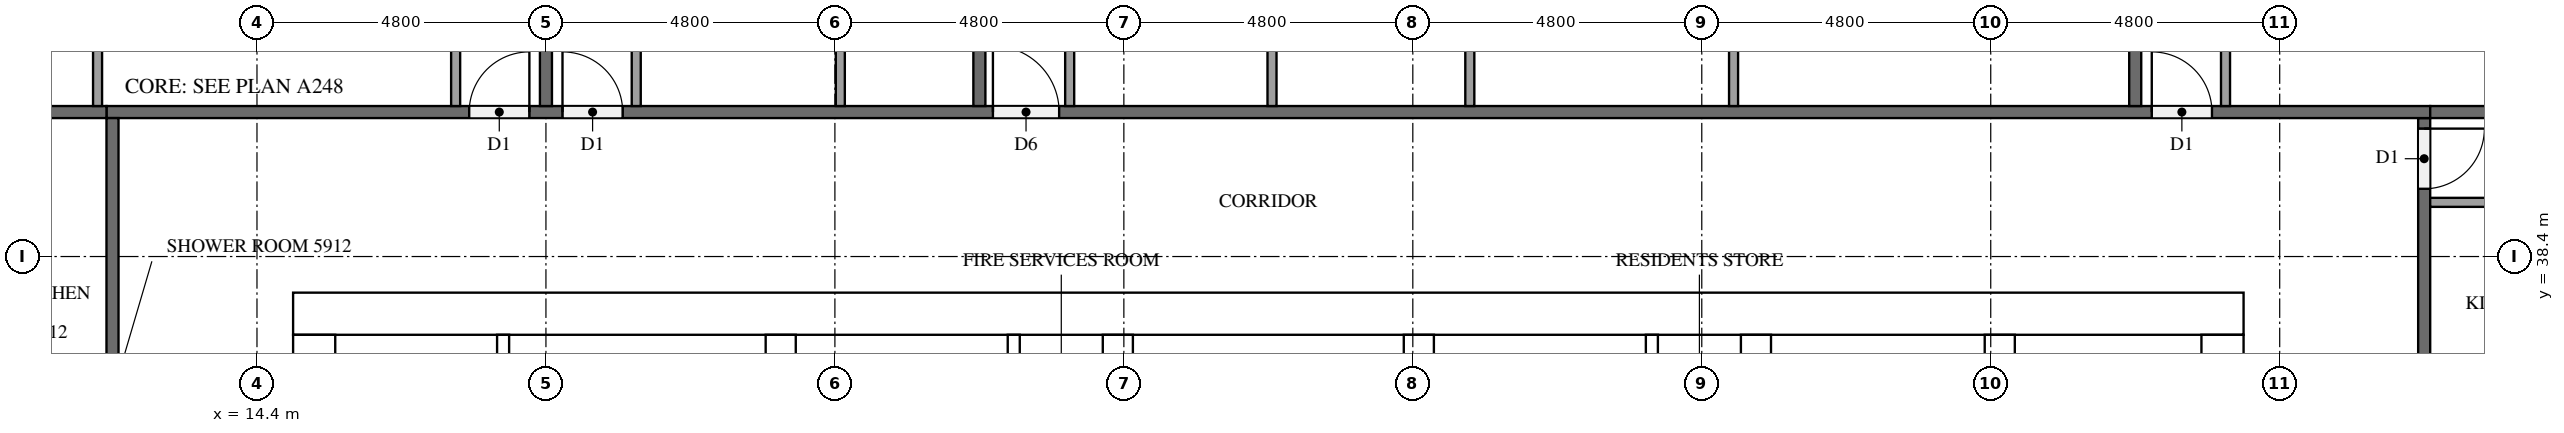
"""IFC4 building model, lengths in metres.
Left out: names, types, materials, properties, quantities, classifications, styles, units other than length and angle.
Written with IfcOpenShell. Run it as: python <this file> out.ifc"""

import sys

from ifc_helpers import new_model, si_unit, direction, frame, frame_2d, origin, place, context, subcontext, project, spatial, rectangle, extrude, element, fill, save


model = new_model("IFC4")
c1 = context("Model", 3, precision=1e-05, world=origin(), true_north=direction((0.0, 1.0)))
c2 = subcontext(c1, "Body", "Model", "MODEL_VIEW")
j1 = project(units=[si_unit("LENGTHUNIT", "METRE"), si_unit("PLANEANGLEUNIT", "RADIAN")], contexts=[c1])
p1 = place(None, origin())
s1 = spatial("IfcSite", under=j1, at=p1, CompositionType="ELEMENT")
p2 = place(p1, origin())
s2 = spatial("IfcBuilding", under=s1, at=p2, CompositionType="ELEMENT")
p3 = place(p2, frame((0.0, 0.0, 226.3)))
s3 = spatial("IfcBuildingStorey", under=s2, at=p3, CompositionType="ELEMENT", Elevation=226.3)
p4 = place(p3, frame((15.0, 37.45, 0.0), z_axis=(0.0, 0.0, 1.0), x_axis=(1.0, 0.0, 0.0)))
e1 = element("IfcWall", 1, at=p4, inside=s3, PredefinedType="SHEAR", context=c2, shape_type="SweptSolid", body=[
    extrude(rectangle(XDim=32.4, YDim=0.7, at=frame_2d((16.2, 0.0))), origin(), (0.0, 0.0, 1.0), 3.2),
])
p5 = place(p4, frame((15.3, 0.0, 0.0)))
e2 = element("IfcOpeningElement", 2, at=p5, cuts=e1, PredefinedType="OPENING", context=c2, shape_type="SweptSolid", body=[
    extrude(rectangle(XDim=1.8, YDim=2.1, at=frame_2d((0.9, 1.05))), frame((0.0, 0.36, 0.0), z_axis=(0.0, -1.0, 0.0), x_axis=(1.0, 0.0, 0.0)), (0.0, 0.0, 1.0), 0.72),
])
p6 = place(p4, frame((1.544, 0.0, 0.0)))
e3 = element("IfcOpeningElement", 3, at=p6, cuts=e1, PredefinedType="OPENING", context=c2, shape_type="SweptSolid", body=[
    extrude(rectangle(XDim=1.0, YDim=2.1, at=frame_2d((0.5, 1.05))), frame((0.0, 0.36, 0.0), z_axis=(0.0, -1.0, 0.0), x_axis=(1.0, 0.0, 0.0)), (0.0, 0.0, 1.0), 0.72),
])
p7 = place(p4, frame((5.219, 0.0, 0.0)))
e4 = element("IfcOpeningElement", 4, at=p7, cuts=e1, PredefinedType="OPENING", context=c2, shape_type="SweptSolid", body=[
    extrude(rectangle(XDim=1.0, YDim=2.1, at=frame_2d((0.5, 1.05))), frame((0.0, 0.36, 0.0), z_axis=(0.0, -1.0, 0.0), x_axis=(1.0, 0.0, 0.0)), (0.0, 0.0, 1.0), 0.72),
])
p8 = place(p3, frame((15.35, 15.7, 0.0), z_axis=(0.0, 0.0, 1.0), x_axis=(0.0, 1.0, 0.0)))
e5 = element("IfcWall", 5, at=p8, inside=s3, PredefinedType="SHEAR", context=c2, shape_type="SweptSolid", body=[
    extrude(rectangle(XDim=21.4, YDim=0.7, at=frame_2d((10.7, 0.0))), origin(), (0.0, 0.0, 1.0), 3.2),
])
p9 = place(p8, frame((5.06, 0.0, 0.0)))
e6 = element("IfcOpeningElement", 6, at=p9, cuts=e5, PredefinedType="OPENING", context=c2, shape_type="SweptSolid", body=[
    extrude(rectangle(XDim=1.2, YDim=2.1, at=frame_2d((0.6, 1.05))), frame((0.0, 0.36, 0.0), z_axis=(0.0, -1.0, 0.0), x_axis=(1.0, 0.0, 0.0)), (0.0, 0.0, 1.0), 0.72),
])
p10 = place(p3, frame((47.05, 15.7, 0.0), z_axis=(0.0, 0.0, 1.0), x_axis=(0.0, 1.0, 0.0)))
e7 = element("IfcWall", 7, at=p10, inside=s3, PredefinedType="SHEAR", context=c2, shape_type="SweptSolid", body=[
    extrude(rectangle(XDim=21.4, YDim=0.7, at=frame_2d((10.7, 0.0))), origin(), (0.0, 0.0, 1.0), 3.2),
])
p11 = place(p10, frame((10.4, 0.0, 0.0)))
e8 = element("IfcOpeningElement", 8, at=p11, cuts=e7, PredefinedType="OPENING", context=c2, shape_type="SweptSolid", body=[
    extrude(rectangle(XDim=1.2, YDim=2.1, at=frame_2d((0.6, 1.05))), frame((0.0, 0.36, 0.0), z_axis=(0.0, -1.0, 0.0), x_axis=(1.0, 0.0, 0.0)), (0.0, 0.0, 1.0), 0.72),
])
p12 = place(p3, frame((23.1, 15.7, 0.0), z_axis=(0.0, 0.0, 1.0), x_axis=(0.0, 1.0, 0.0)))
e9 = element("IfcWall", 9, at=p12, inside=s3, PredefinedType="SHEAR", context=c2, shape_type="SweptSolid", body=[
    extrude(rectangle(XDim=21.4, YDim=0.5, at=frame_2d((10.7, 0.0))), origin(), (0.0, 0.0, 1.0), 3.2),
])
p13 = place(p3, frame((39.3, 27.75, 0.0), z_axis=(0.0, 0.0, 1.0), x_axis=(0.0, 1.0, 0.0)))
e10 = element("IfcWall", 10, at=p13, inside=s3, PredefinedType="SHEAR", context=c2, shape_type="SweptSolid", body=[
    extrude(rectangle(XDim=9.35, YDim=0.5, at=frame_2d((4.675, 0.0))), origin(), (0.0, 0.0, 1.0), 3.2),
])
p14 = place(p3, frame((43.35, 27.75, 0.0), z_axis=(0.0, 0.0, 1.0), x_axis=(0.0, 1.0, 0.0)))
e11 = element("IfcWall", 11, at=p14, inside=s3, PredefinedType="SHEAR", context=c2, shape_type="SweptSolid", body=[
    extrude(rectangle(XDim=9.35, YDim=0.5, at=frame_2d((4.675, 0.0))), origin(), (0.0, 0.0, 1.0), 3.2),
])
p15 = place(p14, frame((7.65, 0.0, 0.0)))
e12 = element("IfcOpeningElement", 12, at=p15, cuts=e11, PredefinedType="OPENING", context=c2, shape_type="SweptSolid", body=[
    extrude(rectangle(XDim=1.2, YDim=2.1, at=frame_2d((0.6, 1.05))), frame((0.0, 0.26, 0.0), z_axis=(0.0, -1.0, 0.0), x_axis=(1.0, 0.0, 0.0)), (0.0, 0.0, 1.0), 0.52),
])
for number, where, z_axis, x_axis in (
    (13, (28.7, 33.8, 0.0), (0.0, 0.0, 1.0), (0.0, 1.0, 0.0)),
    (14, (33.7, 33.8, 0.0), (0.0, 0.0, 1.0), (0.0, 1.0, 0.0)),
):
    element("IfcWall", number, at=place(p3, frame(where, z_axis=z_axis, x_axis=x_axis)), inside=s3, PredefinedType="SHEAR", context=c2, shape_type="SweptSolid", body=[
        extrude(rectangle(XDim=3.3, YDim=0.5, at=frame_2d((1.65, 0.0))), origin(), (0.0, 0.0, 1.0), 3.2),
    ])
p16 = place(p3, frame((18.489, 31.5, 0.0), z_axis=(0.0, 0.0, 1.0), x_axis=(0.0, 1.0, 0.0)))
e15 = element("IfcWall", 15, at=p16, inside=s3, PredefinedType="PARTITIONING", context=c2, shape_type="SweptSolid", body=[
    extrude(rectangle(XDim=5.6, YDim=0.2, at=frame_2d((2.8, 0.0))), origin(), (0.0, 0.0, 1.0), 3.2),
])
for number, where, z_axis, x_axis in (
    (16, (26.971, 33.8, 0.0), (0.0, 0.0, 1.0), (0.0, 1.0, 0.0)),
    (17, (37.571, 33.8, 0.0), (0.0, 0.0, 1.0), (0.0, 1.0, 0.0)),
):
    element("IfcWall", number, at=place(p3, frame(where, z_axis=z_axis, x_axis=x_axis)), inside=s3, PredefinedType="PARTITIONING", context=c2, shape_type="SweptSolid", body=[
        extrude(rectangle(XDim=3.3, YDim=0.2, at=frame_2d((1.65, 0.0))), origin(), (0.0, 0.0, 1.0), 3.2),
    ])
p17 = place(p3, frame((50.4, 40.7, 0.0), z_axis=(0.0, 0.0, 1.0), x_axis=(0.0, -1.0, 0.0)))
e18 = element("IfcWall", 18, at=p17, inside=s3, PredefinedType="PARTITIONING", context=c2, shape_type="SweptSolid", body=[
    extrude(rectangle(XDim=28.6, YDim=0.2, at=frame_2d((14.3, 0.0))), origin(), (0.0, 0.0, 1.0), 3.2),
])
p18 = place(p17, frame((21.775, 0.0, 0.0)))
e19 = element("IfcOpeningElement", 19, at=p18, cuts=e18, PredefinedType="OPENING", context=c2, shape_type="SweptSolid", body=[
    extrude(rectangle(XDim=1.0, YDim=2.1, at=frame_2d((0.5, 1.05))), frame((0.0, 0.11, 0.0), z_axis=(0.0, -1.0, 0.0), x_axis=(1.0, 0.0, 0.0)), (0.0, 0.0, 1.0), 0.22),
])
p19 = place(p17, frame((7.375, 0.0, 0.0)))
e20 = element("IfcOpeningElement", 20, at=p19, cuts=e18, PredefinedType="OPENING", context=c2, shape_type="SweptSolid", body=[
    extrude(rectangle(XDim=1.0, YDim=2.1, at=frame_2d((0.5, 1.05))), frame((0.0, 0.11, 0.0), z_axis=(0.0, -1.0, 0.0), x_axis=(1.0, 0.0, 0.0)), (0.0, 0.0, 1.0), 0.22),
])
p20 = place(p17, frame((0.175, 0.0, 0.0)))
e21 = element("IfcOpeningElement", 21, at=p20, cuts=e18, PredefinedType="OPENING", context=c2, shape_type="SweptSolid", body=[
    extrude(rectangle(XDim=1.0, YDim=2.1, at=frame_2d((0.5, 1.05))), frame((0.0, 0.11, 0.0), z_axis=(0.0, -1.0, 0.0), x_axis=(1.0, 0.0, 0.0)), (0.0, 0.0, 1.0), 0.22),
])
p21 = place(p3, frame((11.9, 40.8, 0.0), z_axis=(0.0, 0.0, 1.0), x_axis=(1.0, 0.0, 0.0)))
e22 = element("IfcWall", 22, at=p21, inside=s3, PredefinedType="PARTITIONING", context=c2, shape_type="SweptSolid", body=[
    extrude(rectangle(XDim=38.6, YDim=0.2, at=frame_2d((19.3, 0.0))), origin(), (0.0, 0.0, 1.0), 3.2),
])
p22 = place(p21, frame((33.975, 0.0, 0.0)))
e23 = element("IfcOpeningElement", 23, at=p22, cuts=e22, PredefinedType="OPENING", context=c2, shape_type="SweptSolid", body=[
    extrude(rectangle(XDim=1.0, YDim=2.1, at=frame_2d((0.5, 1.05))), frame((0.0, 0.11, 0.0), z_axis=(0.0, -1.0, 0.0), x_axis=(1.0, 0.0, 0.0)), (0.0, 0.0, 1.0), 0.22),
])
p23 = place(p21, frame((14.725, 0.0, 0.0)))
e24 = element("IfcOpeningElement", 24, at=p23, cuts=e22, PredefinedType="OPENING", context=c2, shape_type="SweptSolid", body=[
    extrude(rectangle(XDim=1.1, YDim=2.1, at=frame_2d((0.55, 1.05))), frame((0.0, 0.11, 0.0), z_axis=(0.0, -1.0, 0.0), x_axis=(1.0, 0.0, 0.0)), (0.0, 0.0, 1.0), 0.22),
])
p24 = place(p21, frame((7.575, 0.0, 0.0)))
e25 = element("IfcOpeningElement", 25, at=p24, cuts=e22, PredefinedType="OPENING", context=c2, shape_type="SweptSolid", body=[
    extrude(rectangle(XDim=1.0, YDim=2.1, at=frame_2d((0.5, 1.05))), frame((0.0, 0.11, 0.0), z_axis=(0.0, -1.0, 0.0), x_axis=(1.0, 0.0, 0.0)), (0.0, 0.0, 1.0), 0.22),
])
p25 = place(p21, frame((6.025, 0.0, 0.0)))
e26 = element("IfcOpeningElement", 26, at=p25, cuts=e22, PredefinedType="OPENING", context=c2, shape_type="SweptSolid", body=[
    extrude(rectangle(XDim=1.0, YDim=2.1, at=frame_2d((0.5, 1.05))), frame((0.0, 0.11, 0.0), z_axis=(0.0, -1.0, 0.0), x_axis=(1.0, 0.0, 0.0)), (0.0, 0.0, 1.0), 0.22),
])
p26 = place(p3, frame((12.0, 12.1, 0.0), z_axis=(0.0, 0.0, 1.0), x_axis=(0.0, 1.0, 0.0)))
e27 = element("IfcWall", 27, at=p26, inside=s3, PredefinedType="PARTITIONING", context=c2, shape_type="SweptSolid", body=[
    extrude(rectangle(XDim=28.6, YDim=0.2, at=frame_2d((14.3, 0.0))), origin(), (0.0, 0.0, 1.0), 3.2),
])
p27 = place(p26, frame((9.725, 0.0, 0.0)))
e28 = element("IfcOpeningElement", 28, at=p27, cuts=e27, PredefinedType="OPENING", context=c2, shape_type="SweptSolid", body=[
    extrude(rectangle(XDim=1.1, YDim=2.1, at=frame_2d((0.55, 1.05))), frame((0.0, 0.11, 0.0), z_axis=(0.0, -1.0, 0.0), x_axis=(1.0, 0.0, 0.0)), (0.0, 0.0, 1.0), 0.22),
])
p28 = place(p26, frame((0.175, 0.0, 0.0)))
e29 = element("IfcOpeningElement", 29, at=p28, cuts=e27, PredefinedType="OPENING", context=c2, shape_type="SweptSolid", body=[
    extrude(rectangle(XDim=1.0, YDim=2.1, at=frame_2d((0.5, 1.05))), frame((0.0, 0.11, 0.0), z_axis=(0.0, -1.0, 0.0), x_axis=(1.0, 0.0, 0.0)), (0.0, 0.0, 1.0), 0.22),
])
for number, where, z_axis, x_axis in (
    (30, (50.5, 40.8, 0.0), (0.0, 0.0, 1.0), (1.0, 0.0, 0.0)),
    (31, (45.6, 52.7, 0.0), (0.0, 0.0, 1.0), (0.0, -1.0, 0.0)),
    (32, (26.4, 52.7, 0.0), (0.0, 0.0, 1.0), (0.0, -1.0, 0.0)),
):
    element("IfcWall", number, at=place(p3, frame(where, z_axis=z_axis, x_axis=x_axis)), inside=s3, PredefinedType="PARTITIONING", context=c2, shape_type="SweptSolid", body=[
        extrude(rectangle(XDim=11.8, YDim=0.2, at=frame_2d((5.9, 0.0))), origin(), (0.0, 0.0, 1.0), 3.2),
    ])
p29 = place(p3, frame((19.2, 52.475, 0.0), z_axis=(0.0, 0.0, 1.0), x_axis=(0.0, -1.0, 0.0)))
e33 = element("IfcWall", 33, at=p29, inside=s3, PredefinedType="PARTITIONING", context=c2, shape_type="SweptSolid", body=[
    extrude(rectangle(XDim=11.575, YDim=0.2, at=frame_2d((5.788, 0.0))), origin(), (0.0, 0.0, 1.0), 3.2),
])
p30 = place(p3, frame((4.9, 40.8, 0.0), z_axis=(0.0, 0.0, 1.0), x_axis=(1.0, 0.0, 0.0)))
e34 = element("IfcWall", 34, at=p30, inside=s3, PredefinedType="PARTITIONING", context=c2, shape_type="SweptSolid", body=[
    extrude(rectangle(XDim=7.0, YDim=0.2, at=frame_2d((3.5, 0.0))), origin(), (0.0, 0.0, 1.0), 3.2),
])
p31 = place(p3, frame((50.5, 39.3, 0.0), z_axis=(0.0, 0.0, 1.0), x_axis=(1.0, 0.0, 0.0)))
e35 = element("IfcWall", 35, at=p31, inside=s3, PredefinedType="PARTITIONING", context=c2, shape_type="SweptSolid", body=[
    extrude(rectangle(XDim=3.425, YDim=0.15, at=frame_2d((1.712, 0.0))), origin(), (0.0, 0.0, 1.0), 3.2),
])
p32 = place(p3, frame((47.1, 40.9, 0.0), z_axis=(0.0, 0.0, 1.0), x_axis=(0.0, 1.0, 0.0)))
e36 = element("IfcWall", 36, at=p32, inside=s3, PredefinedType="PARTITIONING", context=c2, shape_type="SweptSolid", body=[
    extrude(rectangle(XDim=3.125, YDim=0.15, at=frame_2d((1.562, 0.0))), origin(), (0.0, 0.0, 1.0), 3.2),
])
for number, where, z_axis, x_axis in (
    (37, (31.261, 40.9, 0.0), (0.0, 0.0, 1.0), (0.0, 1.0, 0.0)),
    (38, (34.547, 40.9, 0.0), (0.0, 0.0, 1.0), (0.0, 1.0, 0.0)),
    (39, (38.928, 40.9, 0.0), (0.0, 0.0, 1.0), (0.0, 1.0, 0.0)),
):
    element("IfcWall", number, at=place(p3, frame(where, z_axis=z_axis, x_axis=x_axis)), inside=s3, PredefinedType="PARTITIONING", context=c2, shape_type="SweptSolid", body=[
        extrude(rectangle(XDim=3.575, YDim=0.15, at=frame_2d((1.788, 0.0))), origin(), (0.0, 0.0, 1.0), 3.2),
    ])
for number, where, z_axis, x_axis in (
    (40, (27.9, 40.9, 0.0), (0.0, 0.0, 1.0), (0.0, 1.0, 0.0)),
    (41, (24.09, 40.9, 0.0), (0.0, 0.0, 1.0), (0.0, 1.0, 0.0)),
):
    element("IfcWall", number, at=place(p3, frame(where, z_axis=z_axis, x_axis=x_axis)), inside=s3, PredefinedType="PARTITIONING", context=c2, shape_type="SweptSolid", body=[
        extrude(rectangle(XDim=3.725, YDim=0.15, at=frame_2d((1.863, 0.0))), origin(), (0.0, 0.0, 1.0), 3.2),
    ])
p33 = place(p3, frame((20.7, 40.9, 0.0), z_axis=(0.0, 0.0, 1.0), x_axis=(0.0, 1.0, 0.0)))
e42 = element("IfcWall", 42, at=p33, inside=s3, PredefinedType="PARTITIONING", context=c2, shape_type="SweptSolid", body=[
    extrude(rectangle(XDim=3.875, YDim=0.15, at=frame_2d((1.938, 0.0))), origin(), (0.0, 0.0, 1.0), 3.2),
])
p34 = place(p3, frame((11.752, 40.9, 0.0), z_axis=(0.0, 0.0, 1.0), x_axis=(0.0, 1.0, 0.0)))
e43 = element("IfcWall", 43, at=p34, inside=s3, PredefinedType="PARTITIONING", context=c2, shape_type="SweptSolid", body=[
    extrude(rectangle(XDim=2.975, YDim=0.15, at=frame_2d((1.488, 0.0))), origin(), (0.0, 0.0, 1.0), 3.2),
])
p35 = place(p3, frame((17.7, 40.9, 0.0), z_axis=(0.0, 0.0, 1.0), x_axis=(0.0, 1.0, 0.0)))
e44 = element("IfcWall", 44, at=p35, inside=s3, PredefinedType="PARTITIONING", context=c2, shape_type="SweptSolid", body=[
    extrude(rectangle(XDim=3.125, YDim=0.15, at=frame_2d((1.562, 0.0))), origin(), (0.0, 0.0, 1.0), 3.2),
])
p36 = place(p5, origin())
e45 = element("IfcDoor", 45, at=p36, inside=s3, OperationType="DOUBLE_DOOR_SINGLE_SWING", PredefinedType="DOOR", context=c2, shape_type="SweptSolid", body=[
    extrude(rectangle(XDim=1.8, YDim=2.1, at=frame_2d((0.9, 1.05))), frame((0.0, 0.025, 0.0), z_axis=(0.0, -1.0, 0.0), x_axis=(1.0, 0.0, 0.0)), (0.0, 0.0, 1.0), 0.05),
])
fill(e2, e45)
p37 = place(p6, origin())
e46 = element("IfcDoor", 46, at=p37, inside=s3, OperationType="SINGLE_SWING_RIGHT", PredefinedType="DOOR", context=c2, shape_type="SweptSolid", body=[
    extrude(rectangle(XDim=1.0, YDim=2.1, at=frame_2d((0.5, 1.05))), frame((0.0, 0.025, 0.0), z_axis=(0.0, -1.0, 0.0), x_axis=(1.0, 0.0, 0.0)), (0.0, 0.0, 1.0), 0.05),
])
fill(e3, e46)
p38 = place(p7, origin())
e47 = element("IfcDoor", 47, at=p38, inside=s3, OperationType="SINGLE_SWING_LEFT", PredefinedType="DOOR", context=c2, shape_type="SweptSolid", body=[
    extrude(rectangle(XDim=1.0, YDim=2.1, at=frame_2d((0.5, 1.05))), frame((0.0, 0.025, 0.0), z_axis=(0.0, -1.0, 0.0), x_axis=(1.0, 0.0, 0.0)), (0.0, 0.0, 1.0), 0.05),
])
fill(e4, e47)
p39 = place(p20, origin())
e48 = element("IfcDoor", 48, at=p39, inside=s3, OperationType="SINGLE_SWING_LEFT", PredefinedType="DOOR", context=c2, shape_type="SweptSolid", body=[
    extrude(rectangle(XDim=1.0, YDim=2.1, at=frame_2d((0.5, 1.05))), frame((0.0, 0.025, 0.0), z_axis=(0.0, -1.0, 0.0), x_axis=(1.0, 0.0, 0.0)), (0.0, 0.0, 1.0), 0.05),
])
fill(e21, e48)
p40 = place(p22, origin())
e49 = element("IfcDoor", 49, at=p40, inside=s3, OperationType="SINGLE_SWING_LEFT", PredefinedType="DOOR", context=c2, shape_type="SweptSolid", body=[
    extrude(rectangle(XDim=1.0, YDim=2.1, at=frame_2d((0.5, 1.05))), frame((0.0, 0.025, 0.0), z_axis=(0.0, -1.0, 0.0), x_axis=(1.0, 0.0, 0.0)), (0.0, 0.0, 1.0), 0.05),
])
fill(e23, e49)
p41 = place(p23, origin())
e50 = element("IfcDoor", 50, at=p41, inside=s3, OperationType="SINGLE_SWING_LEFT", PredefinedType="DOOR", context=c2, shape_type="SweptSolid", body=[
    extrude(rectangle(XDim=1.1, YDim=2.1, at=frame_2d((0.55, 1.05))), frame((0.0, 0.025, 0.0), z_axis=(0.0, -1.0, 0.0), x_axis=(1.0, 0.0, 0.0)), (0.0, 0.0, 1.0), 0.05),
])
fill(e24, e50)
p42 = place(p24, origin())
e51 = element("IfcDoor", 51, at=p42, inside=s3, OperationType="SINGLE_SWING_LEFT", PredefinedType="DOOR", context=c2, shape_type="SweptSolid", body=[
    extrude(rectangle(XDim=1.0, YDim=2.1, at=frame_2d((0.5, 1.05))), frame((0.0, 0.025, 0.0), z_axis=(0.0, -1.0, 0.0), x_axis=(1.0, 0.0, 0.0)), (0.0, 0.0, 1.0), 0.05),
])
fill(e25, e51)
p43 = place(p25, origin())
e52 = element("IfcDoor", 52, at=p43, inside=s3, OperationType="SINGLE_SWING_RIGHT", PredefinedType="DOOR", context=c2, shape_type="SweptSolid", body=[
    extrude(rectangle(XDim=1.0, YDim=2.1, at=frame_2d((0.5, 1.05))), frame((0.0, 0.025, 0.0), z_axis=(0.0, -1.0, 0.0), x_axis=(1.0, 0.0, 0.0)), (0.0, 0.0, 1.0), 0.05),
])
fill(e26, e52)
save(model, sys.argv[1])
